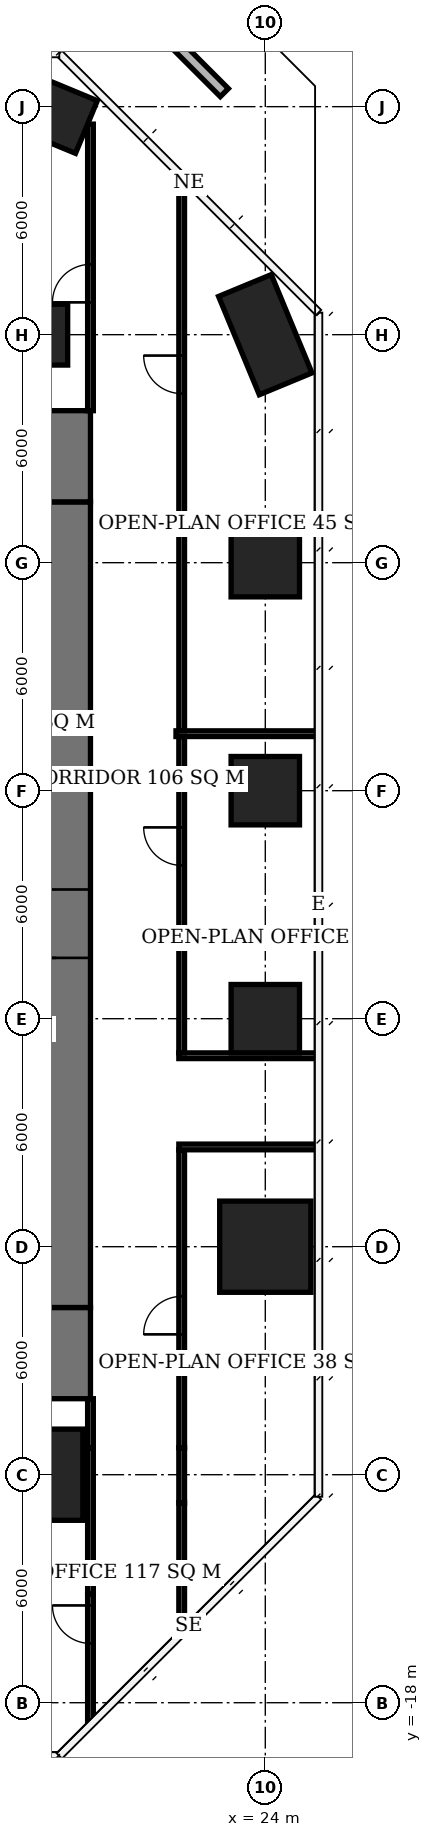
"""IFC4 building model, lengths in metres.
Left out: names, types, materials, properties, quantities, classifications, styles, units other than length and angle.
Written with IfcOpenShell. Run it as: python <this file> out.ifc"""

import sys

from ifc_helpers import new_model, si_unit, direction, frame, frame_2d, origin, origin_2d, place, context, subcontext, project, spatial, rectangle, extrude, element, fill, save


model = new_model("IFC4")
c1 = context("Model", 3, precision=1e-05, world=origin(), true_north=direction((0.0, 1.0)))
c2 = subcontext(c1, "Body", "Model", "MODEL_VIEW")
j1 = project(units=[si_unit("LENGTHUNIT", "METRE"), si_unit("PLANEANGLEUNIT", "RADIAN")], contexts=[c1])
p1 = place(None, origin())
s1 = spatial("IfcSite", under=j1, at=p1, CompositionType="ELEMENT")
p2 = place(p1, origin())
s2 = spatial("IfcBuilding", under=s1, at=p2, CompositionType="ELEMENT")
p3 = place(p2, frame((0.0, 0.0, 117.2)))
s3 = spatial("IfcBuildingStorey", under=s2, at=p3, CompositionType="ELEMENT", Elevation=117.2)
p4 = place(p3, frame((18.0, -12.0, 0.0), z_axis=(0.0, 0.0, 1.0), x_axis=(1.0, 0.0, 0.0)))
e1 = element("IfcColumn", 1, at=p4, inside=s3, PredefinedType="COLUMN", context=c2, shape_type="SweptSolid", body=[
    extrude(rectangle(XDim=2.4, YDim=2.4, at=origin_2d()), origin(), (0.0, 0.0, 1.0), 3.9),
])
p5 = place(p3, frame((18.0, 18.0, 0.0), z_axis=(0.0, 0.0, 1.0), x_axis=(1.0, 0.0, 0.0)))
e2 = element("IfcColumn", 2, at=p5, inside=s3, PredefinedType="COLUMN", context=c2, shape_type="SweptSolid", body=[
    extrude(rectangle(XDim=1.6, YDim=1.6, at=origin_2d()), origin(), (0.0, 0.0, 1.0), 3.9),
])
p6 = place(p3, frame((18.0, 24.0, 0.0), z_axis=(0.0, 0.0, 1.0), x_axis=(0.923879532511, -0.382683432365, 0.0)))
e3 = element("IfcColumn", 3, at=p6, inside=s3, PredefinedType="COLUMN", context=c2, shape_type="SweptSolid", body=[
    extrude(rectangle(XDim=2.8, YDim=1.5, at=origin_2d()), origin(), (0.0, 0.0, 1.0), 3.9),
])
p7 = place(p3, frame((24.0, -6.0, 0.0), z_axis=(0.0, 0.0, 1.0), x_axis=(1.0, 0.0, 0.0)))
e4 = element("IfcColumn", 4, at=p7, inside=s3, PredefinedType="COLUMN", context=c2, shape_type="SweptSolid", body=[
    extrude(rectangle(XDim=2.4, YDim=2.4, at=origin_2d()), origin(), (0.0, 0.0, 1.0), 3.9),
])
for number, where, z_axis, x_axis in (
    (5, (24.0, 0.0, 0.0), (0.0, 0.0, 1.0), (1.0, 0.0, 0.0)),
    (6, (24.0, 6.0, 0.0), (0.0, 0.0, 1.0), (1.0, 0.0, 0.0)),
    (7, (24.0, 12.0, 0.0), (0.0, 0.0, 1.0), (1.0, 0.0, 0.0)),
):
    element("IfcColumn", number, at=place(p3, frame(where, z_axis=z_axis, x_axis=x_axis)), inside=s3, PredefinedType="COLUMN", context=c2, shape_type="SweptSolid", body=[
        extrude(rectangle(XDim=1.8, YDim=1.8, at=origin_2d()), origin(), (0.0, 0.0, 1.0), 3.9),
    ])
p8 = place(p3, frame((24.0, 18.0, 0.0), z_axis=(0.0, 0.0, 1.0), x_axis=(0.382683432365, -0.923879532511, 0.0)))
e8 = element("IfcColumn", 8, at=p8, inside=s3, PredefinedType="COLUMN", context=c2, shape_type="SweptSolid", body=[
    extrude(rectangle(XDim=2.8, YDim=1.5, at=origin_2d()), origin(), (0.0, 0.0, 1.0), 3.9),
])
p9 = place(p3, frame((18.5, -7.6, 0.0), z_axis=(0.0, 0.0, 1.0), x_axis=(0.0, 1.0, 0.0)))
e9 = element("IfcWall", 9, at=p9, inside=s3, PredefinedType="SHEAR", context=c2, shape_type="SweptSolid", body=[
    extrude(rectangle(XDim=21.2, YDim=1.8, at=frame_2d((10.6, 0.0))), origin(), (0.0, 0.0, 1.0), 3.9),
])
p10 = place(p9, frame((9.2, 0.0, 0.0)))
e10 = element("IfcOpeningElement", 10, at=p10, cuts=e9, PredefinedType="OPENING", context=c2, shape_type="SweptSolid", body=[
    extrude(rectangle(XDim=1.8, YDim=2.4, at=frame_2d((0.9, 1.2))), frame((0.0, 0.91, 0.0), z_axis=(0.0, -1.0, 0.0), x_axis=(1.0, 0.0, 0.0)), (0.0, 0.0, 1.0), 1.82),
])
for number, where, z_axis, x_axis in (
    (11, (18.5, -10.0, 0.0), (0.0, 0.0, 1.0), (0.0, 1.0, 0.0)),
    (12, (18.5, 13.6, 0.0), (0.0, 0.0, 1.0), (0.0, 1.0, 0.0)),
):
    element("IfcWall", number, at=place(p3, frame(where, z_axis=z_axis, x_axis=x_axis)), inside=s3, PredefinedType="SHEAR", context=c2, shape_type="SweptSolid", body=[
        extrude(rectangle(XDim=2.4, YDim=1.8, at=frame_2d((1.2, 0.0))), origin(), (0.0, 0.0, 1.0), 3.9),
    ])
p11 = place(p3, frame((18.37, 28.923, 0.0), z_axis=(0.0, 0.0, 1.0), x_axis=(0.707106781187, -0.707106781187, 0.0)))
e13 = element("IfcWall", 13, at=p11, inside=s3, PredefinedType="USERDEFINED", context=c2, shape_type="SweptSolid", body=[
    extrude(rectangle(XDim=6.438, YDim=0.3, at=frame_2d((3.219, 0.0))), origin(), (0.0, 0.0, 1.0), 0.6),
])
p12 = place(p3, frame((19.4, -18.489, 0.0), z_axis=(0.0, 0.0, 1.0), x_axis=(0.0, 1.0, 0.0)))
e14 = element("IfcWall", 14, at=p12, inside=s3, PredefinedType="PARTITIONING", context=c2, shape_type="SweptSolid", body=[
    extrude(rectangle(XDim=3.349, YDim=0.15, at=frame_2d((1.675, 0.0))), origin(), (0.0, 0.0, 1.0), 3.65),
])
p13 = place(p12, frame((2.049, 0.0, 0.0)))
e15 = element("IfcOpeningElement", 15, at=p13, cuts=e14, PredefinedType="OPENING", context=c2, shape_type="SweptSolid", body=[
    extrude(rectangle(XDim=1.0, YDim=2.1, at=frame_2d((0.5, 1.05))), frame((0.0, 0.085, 0.0), z_axis=(0.0, -1.0, 0.0), x_axis=(1.0, 0.0, 0.0)), (0.0, 0.0, 1.0), 0.17),
])
p14 = place(p3, frame((19.4, -15.14, 0.0), z_axis=(0.0, 0.0, 1.0), x_axis=(0.0, 1.0, 0.0)))
e16 = element("IfcWall", 16, at=p14, inside=s3, PredefinedType="PARTITIONING", context=c2, shape_type="SweptSolid", body=[
    extrude(rectangle(XDim=3.85, YDim=0.15, at=frame_2d((1.925, 0.0))), origin(), (0.0, 0.0, 1.0), 2.65),
])
p15 = place(p3, frame((19.4, -11.29, 0.0), z_axis=(0.0, 0.0, 1.0), x_axis=(0.0, 1.0, 0.0)))
e17 = element("IfcWall", 17, at=p15, inside=s3, PredefinedType="PARTITIONING", context=c2, shape_type="SweptSolid", body=[
    extrude(rectangle(XDim=1.29, YDim=0.15, at=frame_2d((0.645, 0.0))), origin(), (0.0, 0.0, 1.0), 3.65),
])
p16 = place(p3, frame((19.4, 16.0, 0.0), z_axis=(0.0, 0.0, 1.0), x_axis=(0.0, 1.0, 0.0)))
e18 = element("IfcWall", 18, at=p16, inside=s3, PredefinedType="PARTITIONING", context=c2, shape_type="SweptSolid", body=[
    extrude(rectangle(XDim=7.541, YDim=0.15, at=frame_2d((3.77, 0.0))), origin(), (0.0, 0.0, 1.0), 3.65),
])
p17 = place(p16, frame((2.85, 0.0, 0.0)))
e19 = element("IfcOpeningElement", 19, at=p17, cuts=e18, PredefinedType="OPENING", context=c2, shape_type="SweptSolid", body=[
    extrude(rectangle(XDim=1.0, YDim=2.1, at=frame_2d((0.5, 1.05))), frame((0.0, 0.085, 0.0), z_axis=(0.0, -1.0, 0.0), x_axis=(1.0, 0.0, 0.0)), (0.0, 0.0, 1.0), 0.17),
])
p18 = place(p3, frame((21.8, -16.089, 0.0), z_axis=(0.0, 0.0, 1.0), x_axis=(0.0, 1.0, 0.0)))
e20 = element("IfcWall", 20, at=p18, inside=s3, PredefinedType="PARTITIONING", context=c2, shape_type="SweptSolid", body=[
    extrude(rectangle(XDim=3.349, YDim=0.15, at=frame_2d((1.675, 0.0))), origin(), (0.0, 0.0, 1.0), 3.65),
])
p19 = place(p3, frame((21.8, -12.74, 0.0), z_axis=(0.0, 0.0, 1.0), x_axis=(0.0, 1.0, 0.0)))
e21 = element("IfcWall", 21, at=p19, inside=s3, PredefinedType="PARTITIONING", context=c2, shape_type="SweptSolid", body=[
    extrude(rectangle(XDim=1.45, YDim=0.15, at=frame_2d((0.725, 0.0))), origin(), (0.0, 0.0, 1.0), 2.65),
])
p20 = place(p3, frame((21.8, -11.29, 0.0), z_axis=(0.0, 0.0, 1.0), x_axis=(0.0, 1.0, 0.0)))
e22 = element("IfcWall", 22, at=p20, inside=s3, PredefinedType="PARTITIONING", context=c2, shape_type="SweptSolid", body=[
    extrude(rectangle(XDim=7.84, YDim=0.15, at=frame_2d((3.92, 0.0))), origin(), (0.0, 0.0, 1.0), 3.65),
])
p21 = place(p20, frame((2.983, 0.0, 0.0)))
e23 = element("IfcOpeningElement", 23, at=p21, cuts=e22, PredefinedType="OPENING", context=c2, shape_type="SweptSolid", body=[
    extrude(rectangle(XDim=1.0, YDim=2.1, at=frame_2d((0.5, 1.05))), frame((0.0, 0.085, 0.0), z_axis=(0.0, -1.0, 0.0), x_axis=(1.0, 0.0, 0.0)), (0.0, 0.0, 1.0), 0.17),
])
p22 = place(p3, frame((21.725, -3.375, 0.0), z_axis=(0.0, 0.0, 1.0), x_axis=(1.0, 0.0, 0.0)))
e24 = element("IfcWall", 24, at=p22, inside=s3, PredefinedType="PARTITIONING", context=c2, shape_type="SweptSolid", body=[
    extrude(rectangle(XDim=3.625, YDim=0.15, at=frame_2d((1.812, 0.0))), origin(), (0.0, 0.0, 1.0), 3.65),
])
p23 = place(p3, frame((21.8, -0.9, 0.0), z_axis=(0.0, 0.0, 1.0), x_axis=(0.0, 1.0, 0.0)))
e25 = element("IfcWall", 25, at=p23, inside=s3, PredefinedType="PARTITIONING", context=c2, shape_type="SweptSolid", body=[
    extrude(rectangle(XDim=8.325, YDim=0.15, at=frame_2d((4.163, 0.0))), origin(), (0.0, 0.0, 1.0), 3.65),
])
p24 = place(p23, frame((4.934, 0.0, 0.0)))
e26 = element("IfcOpeningElement", 26, at=p24, cuts=e25, PredefinedType="OPENING", context=c2, shape_type="SweptSolid", body=[
    extrude(rectangle(XDim=1.0, YDim=2.1, at=frame_2d((0.5, 1.05))), frame((0.0, 0.085, 0.0), z_axis=(0.0, -1.0, 0.0), x_axis=(1.0, 0.0, 0.0)), (0.0, 0.0, 1.0), 0.17),
])
p25 = place(p3, frame((21.725, -0.975, 0.0), z_axis=(0.0, 0.0, 1.0), x_axis=(1.0, 0.0, 0.0)))
e27 = element("IfcWall", 27, at=p25, inside=s3, PredefinedType="PARTITIONING", context=c2, shape_type="SweptSolid", body=[
    extrude(rectangle(XDim=3.675, YDim=0.15, at=frame_2d((1.837, 0.0))), origin(), (0.0, 0.0, 1.0), 3.65),
])
p26 = place(p3, frame((21.8, 7.575, 0.0), z_axis=(0.0, 0.0, 1.0), x_axis=(0.0, 1.0, 0.0)))
e28 = element("IfcWall", 28, at=p26, inside=s3, PredefinedType="PARTITIONING", context=c2, shape_type="SweptSolid", body=[
    extrude(rectangle(XDim=14.514, YDim=0.15, at=frame_2d((7.257, 0.0))), origin(), (0.0, 0.0, 1.0), 3.65),
])
p27 = place(p26, frame((8.875, 0.0, 0.0)))
e29 = element("IfcOpeningElement", 29, at=p27, cuts=e28, PredefinedType="OPENING", context=c2, shape_type="SweptSolid", body=[
    extrude(rectangle(XDim=1.0, YDim=2.1, at=frame_2d((0.5, 1.05))), frame((0.0, 0.085, 0.0), z_axis=(0.0, -1.0, 0.0), x_axis=(1.0, 0.0, 0.0)), (0.0, 0.0, 1.0), 0.17),
])
p28 = place(p3, frame((21.65, 7.5, 0.0), z_axis=(0.0, 0.0, 1.0), x_axis=(1.0, 0.0, 0.0)))
e30 = element("IfcWall", 30, at=p28, inside=s3, PredefinedType="PARTITIONING", context=c2, shape_type="SweptSolid", body=[
    extrude(rectangle(XDim=3.75, YDim=0.15, at=frame_2d((1.875, 0.0))), origin(), (0.0, 0.0, 1.0), 3.65),
])
p29 = place(p10, origin())
e31 = element("IfcDoor", 31, at=p29, inside=s3, OperationType="DOUBLE_DOOR_SINGLE_SWING", PredefinedType="DOOR", context=c2, shape_type="SweptSolid", body=[
    extrude(rectangle(XDim=1.8, YDim=2.4, at=frame_2d((0.9, 1.2))), frame((0.0, 0.025, 0.0), z_axis=(0.0, -1.0, 0.0), x_axis=(1.0, 0.0, 0.0)), (0.0, 0.0, 1.0), 0.05),
])
fill(e10, e31)
p30 = place(p13, origin())
e32 = element("IfcDoor", 32, at=p30, inside=s3, OperationType="SINGLE_SWING_RIGHT", PredefinedType="DOOR", context=c2, shape_type="SweptSolid", body=[
    extrude(rectangle(XDim=1.0, YDim=2.1, at=frame_2d((0.5, 1.05))), frame((0.0, 0.025, 0.0), z_axis=(0.0, -1.0, 0.0), x_axis=(1.0, 0.0, 0.0)), (0.0, 0.0, 1.0), 0.05),
])
fill(e15, e32)
p31 = place(p21, origin())
e33 = element("IfcDoor", 33, at=p31, inside=s3, OperationType="SINGLE_SWING_LEFT", PredefinedType="DOOR", context=c2, shape_type="SweptSolid", body=[
    extrude(rectangle(XDim=1.0, YDim=2.1, at=frame_2d((0.5, 1.05))), frame((0.0, 0.025, 0.0), z_axis=(0.0, -1.0, 0.0), x_axis=(1.0, 0.0, 0.0)), (0.0, 0.0, 1.0), 0.05),
])
fill(e23, e33)
p32 = place(p24, origin())
e34 = element("IfcDoor", 34, at=p32, inside=s3, OperationType="SINGLE_SWING_RIGHT", PredefinedType="DOOR", context=c2, shape_type="SweptSolid", body=[
    extrude(rectangle(XDim=1.0, YDim=2.1, at=frame_2d((0.5, 1.05))), frame((0.0, 0.025, 0.0), z_axis=(0.0, -1.0, 0.0), x_axis=(1.0, 0.0, 0.0)), (0.0, 0.0, 1.0), 0.05),
])
fill(e26, e34)
p33 = place(p27, origin())
e35 = element("IfcDoor", 35, at=p33, inside=s3, OperationType="SINGLE_SWING_RIGHT", PredefinedType="DOOR", context=c2, shape_type="SweptSolid", body=[
    extrude(rectangle(XDim=1.0, YDim=2.1, at=frame_2d((0.5, 1.05))), frame((0.0, 0.025, 0.0), z_axis=(0.0, -1.0, 0.0), x_axis=(1.0, 0.0, 0.0)), (0.0, 0.0, 1.0), 0.05),
])
fill(e29, e35)
p34 = place(p17, origin())
e36 = element("IfcDoor", 36, at=p34, inside=s3, OperationType="SINGLE_SWING_LEFT", PredefinedType="DOOR", context=c2, shape_type="SweptSolid", body=[
    extrude(rectangle(XDim=1.0, YDim=2.1, at=frame_2d((0.5, 1.05))), frame((0.0, 0.025, 0.0), z_axis=(0.0, -1.0, 0.0), x_axis=(1.0, 0.0, 0.0)), (0.0, 0.0, 1.0), 0.05),
])
fill(e19, e36)
save(model, sys.argv[1])
